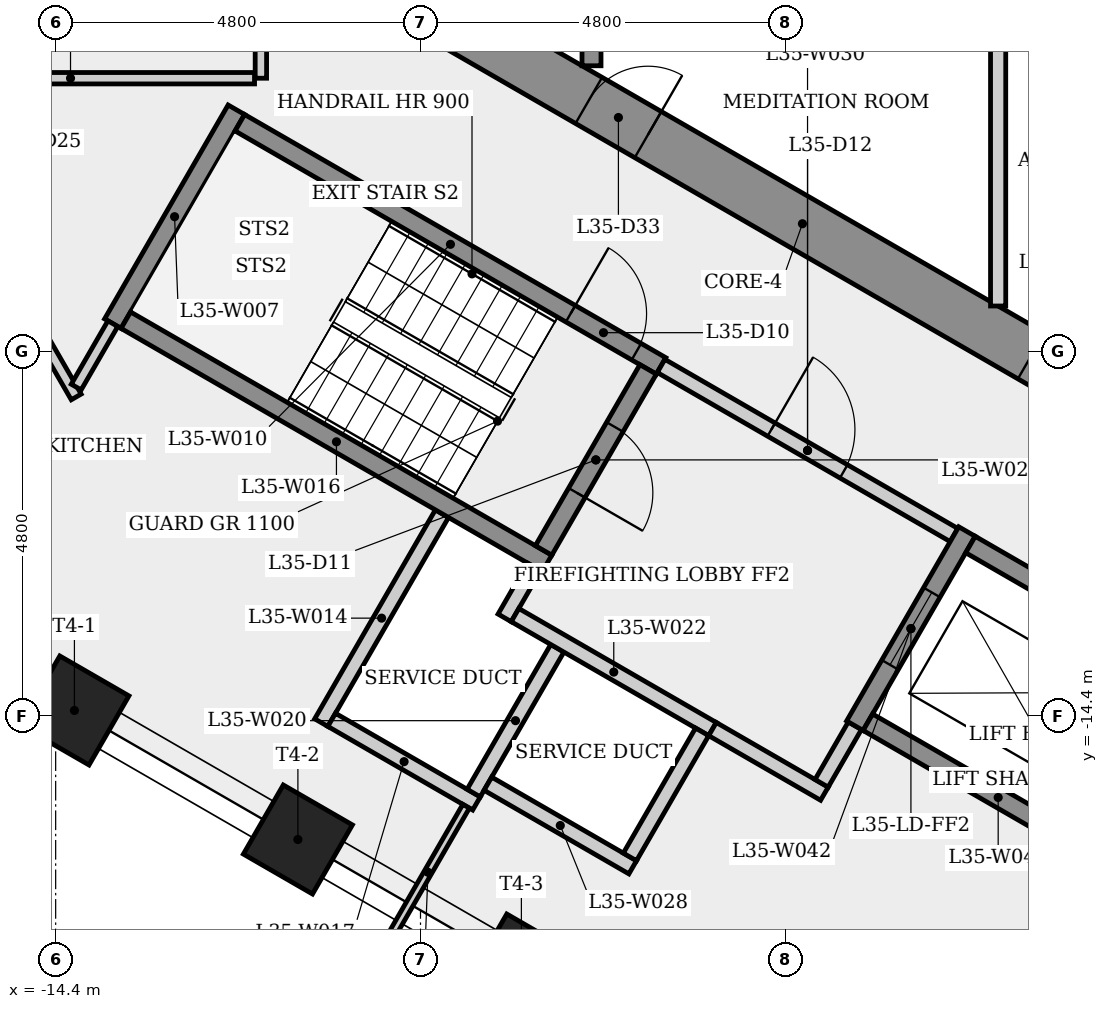
"""IFC4 building model, lengths in metres.
Left out: names, types, materials, properties, quantities, classifications, styles, units other than length and angle.
Written with IfcOpenShell. Run it as: python <this file> out.ifc"""

import sys

from ifc_helpers import new_model, si_unit, direction, frame, frame_2d, origin, origin_2d, place, context, subcontext, project, spatial, rectangle, extrude, element, fill, save


model = new_model("IFC4")
c1 = context("Model", 3, precision=1e-05, world=origin(), true_north=direction((0.0, 1.0)))
c2 = subcontext(c1, "Body", "Model", "MODEL_VIEW")
j1 = project(units=[si_unit("LENGTHUNIT", "METRE"), si_unit("PLANEANGLEUNIT", "RADIAN")], contexts=[c1])
p1 = place(None, origin())
s1 = spatial("IfcSite", under=j1, at=p1, CompositionType="ELEMENT")
p2 = place(p1, origin())
s2 = spatial("IfcBuilding", under=s1, at=p2, CompositionType="ELEMENT")
p3 = place(p2, frame((0.0, 0.0, 132.5)))
s3 = spatial("IfcBuildingStorey", under=s2, at=p3, CompositionType="ELEMENT", Elevation=132.5)
p4 = place(p3, frame((-9.325, -5.182, 0.0), z_axis=(0.0, 0.0, 1.0), x_axis=(0.866023993627, -0.500002442456, 0.0)))
e1 = element("IfcWall", 1, at=p4, inside=s3, PredefinedType="SHEAR", context=c2, shape_type="SweptSolid", body=[
    extrude(rectangle(XDim=10.97, YDim=0.7, at=frame_2d((5.485, 0.0))), origin(), (0.0, 0.0, 1.0), 3.4),
])
p5 = place(p4, frame((2.239, 0.0, 0.0)))
e2 = element("IfcOpeningElement", 2, at=p5, cuts=e1, PredefinedType="OPENING", context=c2, shape_type="SweptSolid", body=[
    extrude(rectangle(XDim=0.9, YDim=2.1, at=frame_2d((0.45, 1.05))), frame((0.0, 0.36, 0.0), z_axis=(0.0, -1.0, 0.0), x_axis=(1.0, 0.0, 0.0)), (0.0, 0.0, 1.0), 0.72),
])
p6 = place(p4, frame((8.96, 0.0, 0.0)))
e3 = element("IfcOpeningElement", 3, at=p6, cuts=e1, PredefinedType="OPENING", context=c2, shape_type="SweptSolid", body=[
    extrude(rectangle(XDim=0.9, YDim=2.1, at=frame_2d((0.45, 1.05))), frame((0.0, 0.36, 0.0), z_axis=(0.0, -1.0, 0.0), x_axis=(1.0, 0.0, 0.0)), (0.0, 0.0, 1.0), 0.72),
])
for number, where, z_axis, x_axis in (
    (4, (-14.153, -14.329, 0.0), (0.0, 0.0, 1.0), (-0.5, -0.866, 0.0)),
    (5, (-11.213, -16.026, 0.0), (0.0, 0.0, 1.0), (-0.5, -0.866, 0.0)),
    (6, (-8.273, -17.724, 0.0), (0.0, 0.0, 1.0), (-0.5, -0.866, 0.0)),
):
    element("IfcColumn", number, at=place(p3, frame(where, z_axis=z_axis, x_axis=x_axis)), inside=s3, PredefinedType="COLUMN", context=c2, shape_type="SweptSolid", body=[
        extrude(rectangle(XDim=1.05, YDim=1.05, at=origin_2d()), origin(), (0.0, 0.0, 1.0), 3.4),
    ])
p7 = place(p3, frame((-16.626, -6.01, 0.0), z_axis=(0.0, 0.0, 1.0), x_axis=(1.0, 0.0, 0.0)))
e7 = element("IfcWall", 7, at=p7, inside=s3, PredefinedType="PARTITIONING", context=c2, shape_type="SweptSolid", body=[
    extrude(rectangle(XDim=4.842, YDim=0.15, at=frame_2d((2.421, 0.0))), origin(), (0.0, 0.0, 1.0), 3.0),
])
p8 = place(p3, frame((-14.13, -10.203, 0.0), z_axis=(0.0, 0.0, 1.0), x_axis=(-0.500000266875, 0.866025249704, 0.0)))
e8 = element("IfcWall", 8, at=p8, inside=s3, PredefinedType="PARTITIONING", context=c2, shape_type="SweptSolid", body=[
    extrude(rectangle(XDim=4.767, YDim=0.15, at=frame_2d((2.384, 0.0))), origin(), (0.0, 0.0, 1.0), 3.0),
])
p9 = place(p8, frame((1.921, 0.0, 0.0)))
e9 = element("IfcOpeningElement", 9, at=p9, cuts=e8, PredefinedType="OPENING", context=c2, shape_type="SweptSolid", body=[
    extrude(rectangle(XDim=1.0, YDim=2.1, at=frame_2d((0.5, 1.05))), frame((0.0, 0.085, 0.0), z_axis=(0.0, -1.0, 0.0), x_axis=(1.0, 0.0, 0.0)), (0.0, 0.0, 1.0), 0.17),
])
p10 = place(p3, frame((-13.648, -9.239, 0.0), z_axis=(0.0, 0.0, 1.0), x_axis=(0.500017246033, 0.866015446554, 0.0)))
e10 = element("IfcWall", 10, at=p10, inside=s3, PredefinedType="SHEAR", context=c2, shape_type="SweptSolid", body=[
    extrude(rectangle(XDim=3.25, YDim=0.25, at=frame_2d((1.625, 0.0))), origin(), (0.0, 0.0, 1.0), 3.0),
])
p11 = place(p3, frame((-13.648, -9.239, 0.0), z_axis=(0.0, 0.0, 1.0), x_axis=(-0.500226934229, -0.865894343596, 0.0)))
e11 = element("IfcWall", 11, at=p11, inside=s3, PredefinedType="PARTITIONING", context=c2, shape_type="SweptSolid", body=[
    extrude(rectangle(XDim=0.963, YDim=0.15, at=frame_2d((0.482, 0.0))), origin(), (0.0, 0.0, 1.0), 3.0),
])
p12 = place(p3, frame((-11.977, -6.595, 0.0), z_axis=(0.0, 0.0, 1.0), x_axis=(0.866025499775, -0.499999833739, 0.0)))
e12 = element("IfcWall", 12, at=p12, inside=s3, PredefinedType="SHEAR", context=c2, shape_type="SweptSolid", body=[
    extrude(rectangle(XDim=6.4, YDim=0.25, at=frame_2d((3.2, 0.0))), origin(), (0.0, 0.0, 1.0), 3.0),
])
p13 = place(p12, frame((5.025, 0.0, 0.0)))
e13 = element("IfcOpeningElement", 13, at=p13, cuts=e12, PredefinedType="OPENING", context=c2, shape_type="SweptSolid", body=[
    extrude(rectangle(XDim=1.0, YDim=2.1, at=frame_2d((0.5, 1.05))), frame((0.0, 0.135, 0.0), z_axis=(0.0, -1.0, 0.0), x_axis=(1.0, 0.0, 0.0)), (0.0, 0.0, 1.0), 0.27),
])
p14 = place(p3, frame((-11.7, -6.01, 0.0), z_axis=(0.0, 0.0, 1.0), x_axis=(0.0, 1.0, 0.0)))
e14 = element("IfcWall", 14, at=p14, inside=s3, PredefinedType="PARTITIONING", context=c2, shape_type="SweptSolid", body=[
    extrude(rectangle(XDim=11.944, YDim=0.15, at=frame_2d((5.972, 0.0))), origin(), (0.0, 0.0, 1.0), 3.0),
])
p15 = place(p14, frame((8.011, 0.0, 0.0)))
e15 = element("IfcOpeningElement", 15, at=p15, cuts=e14, PredefinedType="OPENING", context=c2, shape_type="SweptSolid", body=[
    extrude(rectangle(XDim=1.0, YDim=2.1, at=frame_2d((0.5, 1.05))), frame((0.0, 0.085, 0.0), z_axis=(0.0, -1.0, 0.0), x_axis=(1.0, 0.0, 0.0)), (0.0, 0.0, 1.0), 0.17),
])
p16 = place(p14, frame((2.009, 0.0, 0.0)))
e16 = element("IfcOpeningElement", 16, at=p16, cuts=e14, PredefinedType="OPENING", context=c2, shape_type="SweptSolid", body=[
    extrude(rectangle(XDim=1.0, YDim=2.1, at=frame_2d((0.5, 1.05))), frame((0.0, 0.085, 0.0), z_axis=(0.0, -1.0, 0.0), x_axis=(1.0, 0.0, 0.0)), (0.0, 0.0, 1.0), 0.17),
])
p17 = place(p3, frame((-10.905, -14.489, 0.0), z_axis=(0.0, 0.0, 1.0), x_axis=(0.499959856469, 0.866048579423, 0.0)))
e17 = element("IfcWall", 17, at=p17, inside=s3, PredefinedType="PLUMBINGWALL", context=c2, shape_type="SweptSolid", body=[
    extrude(rectangle(XDim=3.175, YDim=0.2, at=frame_2d((1.587, 0.0))), origin(), (0.0, 0.0, 1.0), 3.0),
])
p18 = place(p3, frame((-13.477, -9.193, 0.0), z_axis=(0.0, 0.0, 1.0), x_axis=(0.866025499775, -0.499999833739, 0.0)))
e18 = element("IfcWall", 18, at=p18, inside=s3, PredefinedType="SHEAR", context=c2, shape_type="SweptSolid", body=[
    extrude(rectangle(XDim=6.4, YDim=0.25, at=frame_2d((3.2, 0.0))), origin(), (0.0, 0.0, 1.0), 3.0),
])
p19 = place(p3, frame((-8.863, -15.552, 0.0), z_axis=(0.0, 0.0, 1.0), x_axis=(-0.866035918664, 0.499981787252, 0.0)))
e19 = element("IfcWall", 19, at=p19, inside=s3, PredefinedType="PLUMBINGWALL", context=c2, shape_type="SweptSolid", body=[
    extrude(rectangle(XDim=2.2, YDim=0.2, at=frame_2d((1.1, 0.0))), origin(), (0.0, 0.0, 1.0), 3.0),
])
p20 = place(p3, frame((-9.0, -15.588, 0.0), z_axis=(0.0, 0.0, 1.0), x_axis=(-0.500038395149, -0.8660032352, 0.0)))
e20 = element("IfcWall", 20, at=p20, inside=s3, PredefinedType="PARTITIONING", context=c2, shape_type="SweptSolid", body=[
    extrude(rectangle(XDim=2.007, YDim=0.1, at=frame_2d((1.003, 0.0))), origin(), (0.0, 0.0, 1.0), 3.0),
])
p21 = place(p3, frame((-8.9, -15.415, 0.0), z_axis=(0.0, 0.0, 1.0), x_axis=(0.499946605688, 0.86605622881, 0.0)))
e21 = element("IfcWall", 21, at=p21, inside=s3, PredefinedType="PLUMBINGWALL", context=c2, shape_type="SweptSolid", body=[
    extrude(rectangle(XDim=2.2, YDim=0.2, at=frame_2d((1.1, 0.0))), origin(), (0.0, 0.0, 1.0), 3.0),
])
p22 = place(p3, frame((-8.493, -13.11, 0.0), z_axis=(0.0, 0.0, 1.0), x_axis=(0.500067724834, 0.865986299303, 0.0)))
e22 = element("IfcWall", 22, at=p22, inside=s3, PredefinedType="PLUMBINGWALL", context=c2, shape_type="SweptSolid", body=[
    extrude(rectangle(XDim=0.775, YDim=0.2, at=frame_2d((0.388, 0.0))), origin(), (0.0, 0.0, 1.0), 3.0),
])
p23 = place(p3, frame((-8.356, -13.073, 0.0), z_axis=(0.0, 0.0, 1.0), x_axis=(0.866031096941, -0.499990139034, 0.0)))
e23 = element("IfcWall", 23, at=p23, inside=s3, PredefinedType="PLUMBINGWALL", context=c2, shape_type="SweptSolid", body=[
    extrude(rectangle(XDim=3.0, YDim=0.2, at=frame_2d((1.5, 0.0))), origin(), (0.0, 0.0, 1.0), 3.0),
])
p24 = place(p3, frame((-7.35, -5.846, 0.0), z_axis=(0.0, 0.0, 1.0), x_axis=(0.0, 1.0, 0.0)))
e24 = element("IfcWall", 24, at=p24, inside=s3, PredefinedType="SHEAR", context=c2, shape_type="SweptSolid", body=[
    extrude(rectangle(XDim=4.171, YDim=0.25, at=frame_2d((2.085, 0.0))), origin(), (0.0, 0.0, 1.0), 3.0),
])
p25 = place(p3, frame((-6.808, -16.392, 0.0), z_axis=(0.0, 0.0, 1.0), x_axis=(-0.866008176907, 0.50002983664, 0.0)))
e25 = element("IfcWall", 25, at=p25, inside=s3, PredefinedType="PLUMBINGWALL", context=c2, shape_type="SweptSolid", body=[
    extrude(rectangle(XDim=2.2, YDim=0.2, at=frame_2d((1.1, 0.0))), origin(), (0.0, 0.0, 1.0), 3.0),
])
p26 = place(p3, frame((-6.605, -9.841, 0.0), z_axis=(0.0, 0.0, 1.0), x_axis=(-0.499996545922, -0.866027397988, 0.0)))
e26 = element("IfcWall", 26, at=p26, inside=s3, PredefinedType="SHEAR", context=c2, shape_type="SweptSolid", body=[
    extrude(rectangle(XDim=2.75, YDim=0.25, at=frame_2d((1.375, 0.0))), origin(), (0.0, 0.0, 1.0), 3.0),
])
p27 = place(p26, frame((0.875, 0.0, 0.0)))
e27 = element("IfcOpeningElement", 27, at=p27, cuts=e26, PredefinedType="OPENING", context=c2, shape_type="SweptSolid", body=[
    extrude(rectangle(XDim=1.0, YDim=2.1, at=frame_2d((0.5, 1.05))), frame((0.0, 0.135, 0.0), z_axis=(0.0, -1.0, 0.0), x_axis=(1.0, 0.0, 0.0)), (0.0, 0.0, 1.0), 0.27),
])
p28 = place(p3, frame((-6.435, -9.795, 0.0), z_axis=(0.0, 0.0, 1.0), x_axis=(0.866012907634, -0.500021643343, 0.0)))
e28 = element("IfcWall", 28, at=p28, inside=s3, PredefinedType="PARTITIONING", context=c2, shape_type="SweptSolid", body=[
    extrude(rectangle(XDim=4.45, YDim=0.2, at=frame_2d((2.225, 0.0))), origin(), (0.0, 0.0, 1.0), 3.0),
])
p29 = place(p28, frame((1.675, 0.0, 0.0)))
e29 = element("IfcOpeningElement", 29, at=p29, cuts=e28, PredefinedType="OPENING", context=c2, shape_type="SweptSolid", body=[
    extrude(rectangle(XDim=1.1, YDim=2.1, at=frame_2d((0.55, 1.05))), frame((0.0, 0.11, 0.0), z_axis=(0.0, -1.0, 0.0), x_axis=(1.0, 0.0, 0.0)), (0.0, 0.0, 1.0), 0.22),
])
p30 = place(p3, frame((-5.895, -14.61, 0.0), z_axis=(0.0, 0.0, 1.0), x_axis=(-0.500022797313, -0.86601224135, 0.0)))
e30 = element("IfcWall", 30, at=p30, inside=s3, PredefinedType="PLUMBINGWALL", context=c2, shape_type="SweptSolid", body=[
    extrude(rectangle(XDim=1.9, YDim=0.2, at=frame_2d((0.95, 0.0))), origin(), (0.0, 0.0, 1.0), 3.0),
])
p31 = place(p3, frame((-4.286, -15.423, 0.0), z_axis=(0.0, 0.0, 1.0), x_axis=(-0.866025371046, 0.500000056704, 0.0)))
e31 = element("IfcWall", 31, at=p31, inside=s3, PredefinedType="PARTITIONING", context=c2, shape_type="SweptSolid", body=[
    extrude(rectangle(XDim=1.7, YDim=0.2, at=frame_2d((0.85, 0.0))), origin(), (0.0, 0.0, 1.0), 3.0),
])
p32 = place(p3, frame((-3.885, -14.529, 0.0), z_axis=(0.0, 0.0, 1.0), x_axis=(-0.499859285417, -0.866106630146, 0.0)))
e32 = element("IfcWall", 32, at=p32, inside=s3, PredefinedType="PARTITIONING", context=c2, shape_type="SweptSolid", body=[
    extrude(rectangle(XDim=0.875, YDim=0.2, at=frame_2d((0.438, 0.0))), origin(), (0.0, 0.0, 1.0), 3.0),
])
p33 = place(p3, frame((-2.41, -11.974, 0.0), z_axis=(0.0, 0.0, 1.0), x_axis=(-0.500001826776, -0.866024349092, 0.0)))
e33 = element("IfcWall", 33, at=p33, inside=s3, PredefinedType="SHEAR", context=c2, shape_type="SweptSolid", body=[
    extrude(rectangle(XDim=2.95, YDim=0.25, at=frame_2d((1.475, 0.0))), origin(), (0.0, 0.0, 1.0), 3.0),
])
p34 = place(p33, frame((0.925, 0.0, 0.0)))
e34 = element("IfcOpeningElement", 34, at=p34, cuts=e33, PredefinedType="OPENING", context=c2, shape_type="SweptSolid", body=[
    extrude(rectangle(XDim=1.1, YDim=2.1, at=frame_2d((0.55, 1.05))), frame((0.0, 0.135, 0.0), z_axis=(0.0, -1.0, 0.0), x_axis=(1.0, 0.0, 0.0)), (0.0, 0.0, 1.0), 0.27),
])
p35 = place(p3, frame((-2.364, -12.145, 0.0), z_axis=(0.0, 0.0, 1.0), x_axis=(0.86603892542, -0.499976579108, 0.0)))
e35 = element("IfcWall", 35, at=p35, inside=s3, PredefinedType="SHEAR", context=c2, shape_type="SweptSolid", body=[
    extrude(rectangle(XDim=2.162, YDim=0.25, at=frame_2d((1.081, 0.0))), origin(), (0.0, 0.0, 1.0), 3.0),
])
p36 = place(p3, frame((-2.0, -5.275, 0.0), z_axis=(0.0, 0.0, 1.0), x_axis=(0.0, -1.0, 0.0)))
e36 = element("IfcWall", 36, at=p36, inside=s3, PredefinedType="PARTITIONING", context=c2, shape_type="SweptSolid", body=[
    extrude(rectangle(XDim=3.732, YDim=0.2, at=frame_2d((1.866, 0.0))), origin(), (0.0, 0.0, 1.0), 3.0),
])
p37 = place(p3, frame((-0.856, -16.133, 0.0), z_axis=(0.0, 0.0, 1.0), x_axis=(-0.866021716278, 0.500006386895, 0.0)))
e37 = element("IfcWall", 37, at=p37, inside=s3, PredefinedType="SHEAR", context=c2, shape_type="SweptSolid", body=[
    extrude(rectangle(XDim=3.3, YDim=0.25, at=frame_2d((1.65, 0.0))), origin(), (0.0, 0.0, 1.0), 3.0),
])
p38 = place(p13, origin())
e38 = element("IfcDoor", 38, at=p38, inside=s3, OperationType="SINGLE_SWING_LEFT", PredefinedType="DOOR", context=c2, shape_type="SweptSolid", body=[
    extrude(rectangle(XDim=1.0, YDim=2.1, at=frame_2d((0.5, 1.05))), frame((0.0, 0.025, 0.0), z_axis=(0.0, -1.0, 0.0), x_axis=(1.0, 0.0, 0.0)), (0.0, 0.0, 1.0), 0.05),
])
fill(e13, e38)
p39 = place(p27, origin())
e39 = element("IfcDoor", 39, at=p39, inside=s3, OperationType="SINGLE_SWING_RIGHT", PredefinedType="DOOR", context=c2, shape_type="SweptSolid", body=[
    extrude(rectangle(XDim=1.0, YDim=2.1, at=frame_2d((0.5, 1.05))), frame((0.0, 0.025, 0.0), z_axis=(0.0, -1.0, 0.0), x_axis=(1.0, 0.0, 0.0)), (0.0, 0.0, 1.0), 0.05),
])
fill(e27, e39)
p40 = place(p29, origin())
e40 = element("IfcDoor", 40, at=p40, inside=s3, OperationType="SINGLE_SWING_LEFT", PredefinedType="DOOR", context=c2, shape_type="SweptSolid", body=[
    extrude(rectangle(XDim=1.1, YDim=2.1, at=frame_2d((0.55, 1.05))), frame((0.0, 0.025, 0.0), z_axis=(0.0, -1.0, 0.0), x_axis=(1.0, 0.0, 0.0)), (0.0, 0.0, 1.0), 0.05),
])
fill(e29, e40)
p41 = place(p34, origin())
e41 = element("IfcDoor", 41, at=p41, inside=s3, OperationType="SLIDING_TO_LEFT", PredefinedType="DOOR", context=c2, shape_type="SweptSolid", body=[
    extrude(rectangle(XDim=1.1, YDim=2.1, at=frame_2d((0.55, 1.05))), frame((0.0, 0.025, 0.0), z_axis=(0.0, -1.0, 0.0), x_axis=(1.0, 0.0, 0.0)), (0.0, 0.0, 1.0), 0.05),
])
fill(e34, e41)
p42 = place(p5, origin())
e42 = element("IfcDoor", 42, at=p42, inside=s3, OperationType="SINGLE_SWING_RIGHT", PredefinedType="DOOR", context=c2, shape_type="SweptSolid", body=[
    extrude(rectangle(XDim=0.9, YDim=2.1, at=frame_2d((0.45, 1.05))), frame((0.0, 0.025, 0.0), z_axis=(0.0, -1.0, 0.0), x_axis=(1.0, 0.0, 0.0)), (0.0, 0.0, 1.0), 0.05),
])
fill(e2, e42)
save(model, sys.argv[1])
